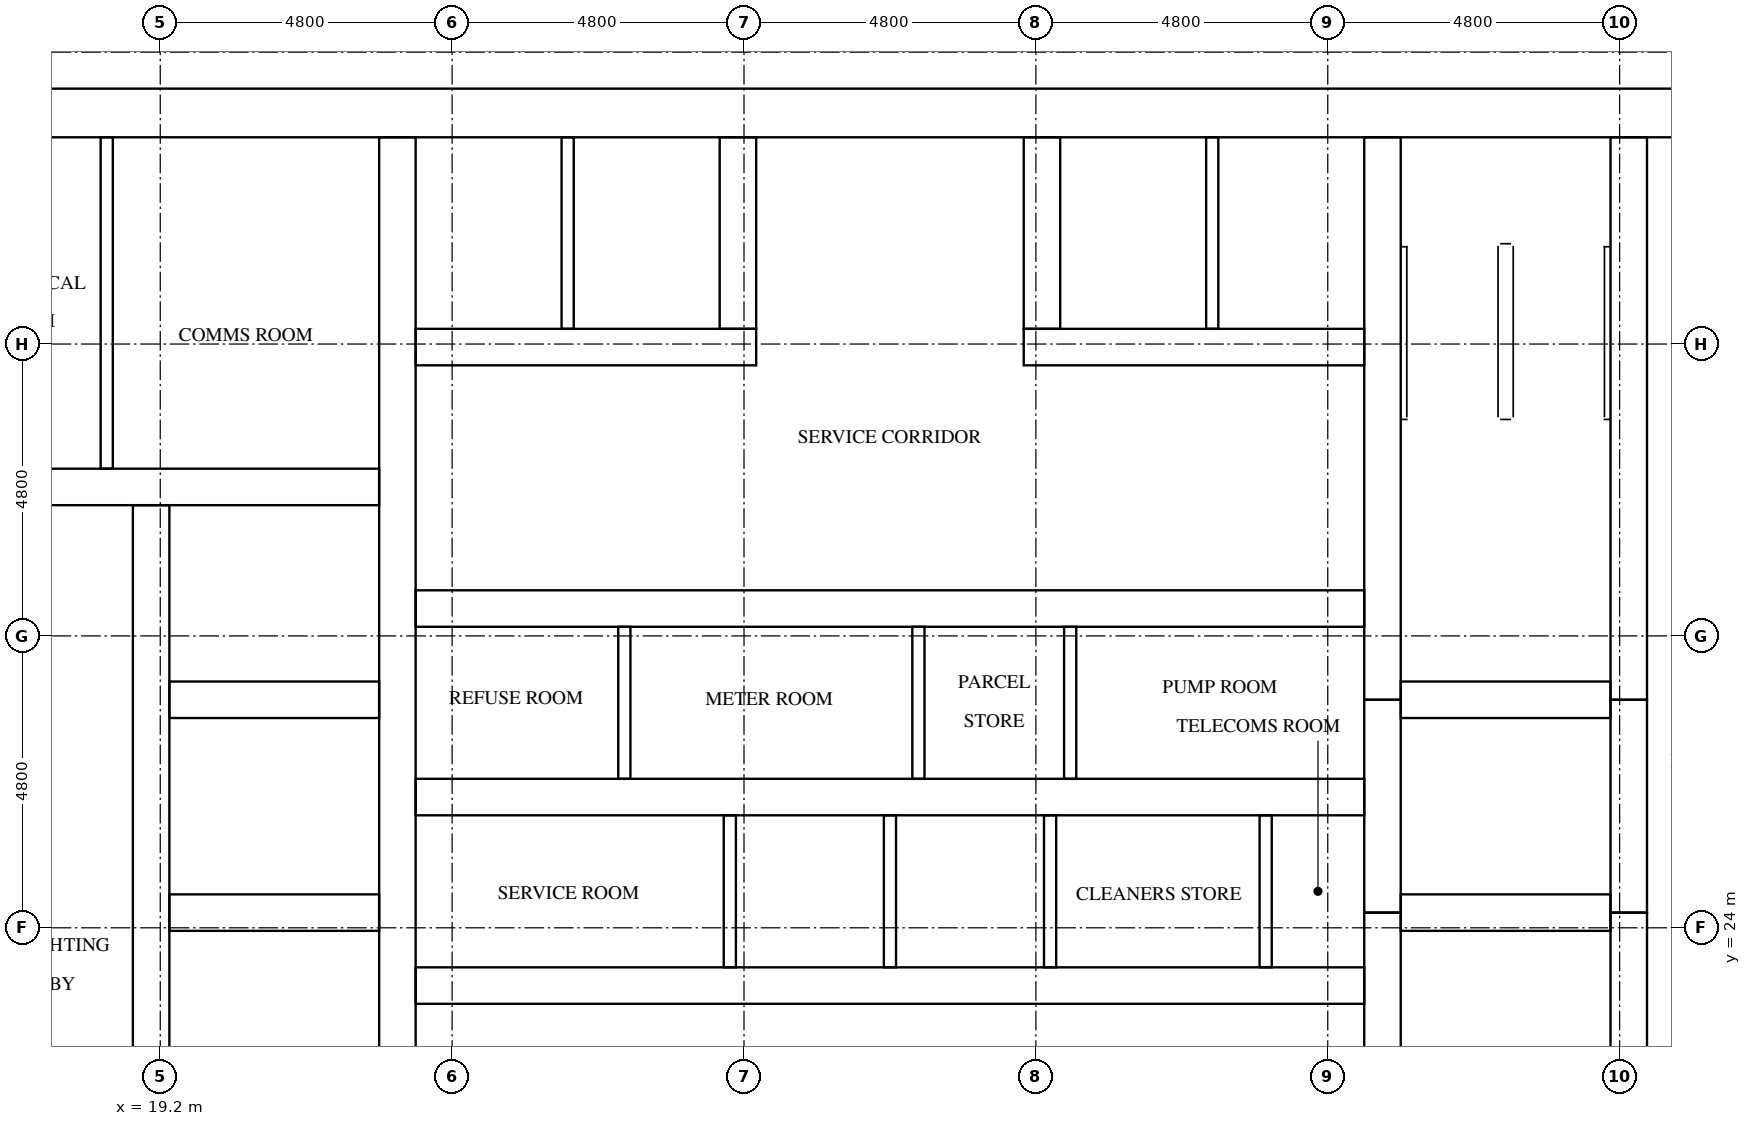
"""IFC4 building model, lengths in metres.
Left out: names, types, materials, properties, quantities, classifications, styles, units other than length and angle.
Written with IfcOpenShell. Run it as: python <this file> out.ifc"""

import sys

from ifc_helpers import new_model, si_unit, direction, frame, frame_2d, origin, place, context, subcontext, project, spatial, rectangle, extrude, element, fill, save


model = new_model("IFC4")
c1 = context("Model", 3, precision=1e-05, world=origin(), true_north=direction((0.0, 1.0)))
c2 = subcontext(c1, "Body", "Model", "MODEL_VIEW")
j1 = project(units=[si_unit("LENGTHUNIT", "METRE"), si_unit("PLANEANGLEUNIT", "RADIAN")], contexts=[c1])
p1 = place(None, origin())
s1 = spatial("IfcSite", under=j1, at=p1, CompositionType="ELEMENT")
p2 = place(p1, origin())
s2 = spatial("IfcBuilding", under=s1, at=p2, CompositionType="ELEMENT")
p3 = place(p2, frame((0.0, 0.0, 126.1)))
s3 = spatial("IfcBuildingStorey", under=s2, at=p3, CompositionType="ELEMENT", Elevation=126.1)
p4 = place(p3, frame((15.0, 37.4, 0.0), z_axis=(0.0, 0.0, 1.0), x_axis=(1.0, 0.0, 0.0)))
e1 = element("IfcWall", 1, at=p4, inside=s3, PredefinedType="SHEAR", context=c2, shape_type="SweptSolid", body=[
    extrude(rectangle(XDim=32.4, YDim=0.8, at=frame_2d((16.2, 0.0))), origin(), (0.0, 0.0, 1.0), 3.2),
])
p5 = place(p4, frame((15.3, 0.0, 0.0)))
e2 = element("IfcOpeningElement", 2, at=p5, cuts=e1, PredefinedType="OPENING", context=c2, shape_type="SweptSolid", body=[
    extrude(rectangle(XDim=1.8, YDim=2.1, at=frame_2d((0.9, 1.05))), frame((0.0, 0.41, 0.0), z_axis=(0.0, -1.0, 0.0), x_axis=(1.0, 0.0, 0.0)), (0.0, 0.0, 1.0), 0.82),
])
p6 = place(p4, frame((1.51, 0.0, 0.0)))
e3 = element("IfcOpeningElement", 3, at=p6, cuts=e1, PredefinedType="OPENING", context=c2, shape_type="SweptSolid", body=[
    extrude(rectangle(XDim=1.0, YDim=2.1, at=frame_2d((0.5, 1.05))), frame((0.0, 0.41, 0.0), z_axis=(0.0, -1.0, 0.0), x_axis=(1.0, 0.0, 0.0)), (0.0, 0.0, 1.0), 0.82),
])
p7 = place(p4, frame((5.11, 0.0, 0.0)))
e4 = element("IfcOpeningElement", 4, at=p7, cuts=e1, PredefinedType="OPENING", context=c2, shape_type="SweptSolid", body=[
    extrude(rectangle(XDim=1.0, YDim=2.1, at=frame_2d((0.5, 1.05))), frame((0.0, 0.41, 0.0), z_axis=(0.0, -1.0, 0.0), x_axis=(1.0, 0.0, 0.0)), (0.0, 0.0, 1.0), 0.82),
])
p8 = place(p3, frame((19.05, 15.8, 0.0), z_axis=(0.0, 0.0, 1.0), x_axis=(0.0, 1.0, 0.0)))
e5 = element("IfcWall", 5, at=p8, inside=s3, PredefinedType="SHEAR", context=c2, shape_type="SweptSolid", body=[
    extrude(rectangle(XDim=15.15, YDim=0.6, at=frame_2d((7.575, 0.0))), origin(), (0.0, 0.0, 1.0), 3.2),
])
p9 = place(p8, frame((9.65, 0.0, 0.0)))
e6 = element("IfcOpeningElement", 6, at=p9, cuts=e5, PredefinedType="OPENING", context=c2, shape_type="SweptSolid", body=[
    extrude(rectangle(XDim=1.1, YDim=2.1, at=frame_2d((0.55, 1.05))), frame((0.0, 0.31, 0.0), z_axis=(0.0, -1.0, 0.0), x_axis=(1.0, 0.0, 0.0)), (0.0, 0.0, 1.0), 0.62),
])
p10 = place(p8, frame((13.15, 0.0, 0.0)))
e7 = element("IfcOpeningElement", 7, at=p10, cuts=e5, PredefinedType="OPENING", context=c2, shape_type="SweptSolid", body=[
    extrude(rectangle(XDim=1.1, YDim=2.1, at=frame_2d((0.55, 1.05))), frame((0.0, 0.31, 0.0), z_axis=(0.0, -1.0, 0.0), x_axis=(1.0, 0.0, 0.0)), (0.0, 0.0, 1.0), 0.62),
])
p11 = place(p8, frame((0.4, 0.0, 0.0)))
e8 = element("IfcOpeningElement", 8, at=p11, cuts=e5, PredefinedType="OPENING", context=c2, shape_type="SweptSolid", body=[
    extrude(rectangle(XDim=1.2, YDim=2.1, at=frame_2d((0.6, 1.05))), frame((0.0, 0.31, 0.0), z_axis=(0.0, -1.0, 0.0), x_axis=(1.0, 0.0, 0.0)), (0.0, 0.0, 1.0), 0.62),
])
p12 = place(p3, frame((23.1, 15.8, 0.0), z_axis=(0.0, 0.0, 1.0), x_axis=(0.0, 1.0, 0.0)))
e9 = element("IfcWall", 9, at=p12, inside=s3, PredefinedType="SHEAR", context=c2, shape_type="SweptSolid", body=[
    extrude(rectangle(XDim=21.2, YDim=0.6, at=frame_2d((10.6, 0.0))), origin(), (0.0, 0.0, 1.0), 3.2),
])
p13 = place(p3, frame((39.3, 15.8, 0.0), z_axis=(0.0, 0.0, 1.0), x_axis=(0.0, 1.0, 0.0)))
e10 = element("IfcWall", 10, at=p13, inside=s3, PredefinedType="SHEAR", context=c2, shape_type="SweptSolid", body=[
    extrude(rectangle(XDim=8.45, YDim=0.6, at=frame_2d((4.225, 0.0))), origin(), (0.0, 0.0, 1.0), 3.2),
])
p14 = place(p3, frame((39.3, 24.25, 0.0), z_axis=(0.0, 0.0, 1.0), x_axis=(0.0, 1.0, 0.0)))
e11 = element("IfcWall", 11, at=p14, inside=s3, PredefinedType="SHEAR", context=c2, shape_type="SweptSolid", body=[
    extrude(rectangle(XDim=3.5, YDim=0.6, at=frame_2d((1.75, 0.0))), origin(), (0.0, 0.0, 1.0), 3.2),
])
p15 = place(p3, frame((39.3, 27.75, 0.0), z_axis=(0.0, 0.0, 1.0), x_axis=(0.0, 1.0, 0.0)))
e12 = element("IfcWall", 12, at=p15, inside=s3, PredefinedType="SHEAR", context=c2, shape_type="SweptSolid", body=[
    extrude(rectangle(XDim=9.25, YDim=0.6, at=frame_2d((4.625, 0.0))), origin(), (0.0, 0.0, 1.0), 3.2),
])
p16 = place(p3, frame((43.35, 15.8, 0.0), z_axis=(0.0, 0.0, 1.0), x_axis=(0.0, 1.0, 0.0)))
e13 = element("IfcWall", 13, at=p16, inside=s3, PredefinedType="SHEAR", context=c2, shape_type="SweptSolid", body=[
    extrude(rectangle(XDim=8.45, YDim=0.6, at=frame_2d((4.225, 0.0))), origin(), (0.0, 0.0, 1.0), 3.2),
])
p17 = place(p16, frame((0.4, 0.0, 0.0)))
e14 = element("IfcOpeningElement", 14, at=p17, cuts=e13, PredefinedType="OPENING", context=c2, shape_type="SweptSolid", body=[
    extrude(rectangle(XDim=1.2, YDim=2.1, at=frame_2d((0.6, 1.05))), frame((0.0, 0.31, 0.0), z_axis=(0.0, -1.0, 0.0), x_axis=(1.0, 0.0, 0.0)), (0.0, 0.0, 1.0), 0.62),
])
p18 = place(p3, frame((43.35, 24.25, 0.0), z_axis=(0.0, 0.0, 1.0), x_axis=(0.0, 1.0, 0.0)))
e15 = element("IfcWall", 15, at=p18, inside=s3, PredefinedType="SHEAR", context=c2, shape_type="SweptSolid", body=[
    extrude(rectangle(XDim=3.5, YDim=0.6, at=frame_2d((1.75, 0.0))), origin(), (0.0, 0.0, 1.0), 3.2),
])
p19 = place(p18, frame((1.2, 0.0, 0.0)))
e16 = element("IfcOpeningElement", 16, at=p19, cuts=e15, PredefinedType="OPENING", context=c2, shape_type="SweptSolid", body=[
    extrude(rectangle(XDim=1.1, YDim=2.1, at=frame_2d((0.55, 1.05))), frame((0.0, 0.31, 0.0), z_axis=(0.0, -1.0, 0.0), x_axis=(1.0, 0.0, 0.0)), (0.0, 0.0, 1.0), 0.62),
])
p20 = place(p3, frame((43.35, 27.75, 0.0), z_axis=(0.0, 0.0, 1.0), x_axis=(0.0, 1.0, 0.0)))
e17 = element("IfcWall", 17, at=p20, inside=s3, PredefinedType="SHEAR", context=c2, shape_type="SweptSolid", body=[
    extrude(rectangle(XDim=9.25, YDim=0.6, at=frame_2d((4.625, 0.0))), origin(), (0.0, 0.0, 1.0), 3.2),
])
p21 = place(p20, frame((7.65, 0.0, 0.0)))
e18 = element("IfcOpeningElement", 18, at=p21, cuts=e17, PredefinedType="OPENING", context=c2, shape_type="SweptSolid", body=[
    extrude(rectangle(XDim=1.2, YDim=2.1, at=frame_2d((0.6, 1.05))), frame((0.0, 0.31, 0.0), z_axis=(0.0, -1.0, 0.0), x_axis=(1.0, 0.0, 0.0)), (0.0, 0.0, 1.0), 0.62),
])
for number, where, z_axis, x_axis in (
    (19, (19.35, 24.25, 0.0), (0.0, 0.0, 1.0), (1.0, 0.0, 0.0)),
    (20, (19.35, 27.75, 0.0), (0.0, 0.0, 1.0), (1.0, 0.0, 0.0)),
):
    element("IfcWall", number, at=place(p3, frame(where, z_axis=z_axis, x_axis=x_axis)), inside=s3, PredefinedType="SHEAR", context=c2, shape_type="SweptSolid", body=[
        extrude(rectangle(XDim=3.45, YDim=0.6, at=frame_2d((1.725, 0.0))), origin(), (0.0, 0.0, 1.0), 3.2),
    ])
p22 = place(p3, frame((15.8, 31.25, 0.0), z_axis=(0.0, 0.0, 1.0), x_axis=(1.0, 0.0, 0.0)))
e21 = element("IfcWall", 21, at=p22, inside=s3, PredefinedType="SHEAR", context=c2, shape_type="SweptSolid", body=[
    extrude(rectangle(XDim=7.0, YDim=0.6, at=frame_2d((3.5, 0.0))), origin(), (0.0, 0.0, 1.0), 3.2),
])
for number, where, z_axis, x_axis in (
    (22, (39.6, 24.25, 0.0), (0.0, 0.0, 1.0), (1.0, 0.0, 0.0)),
    (23, (39.6, 27.75, 0.0), (0.0, 0.0, 1.0), (1.0, 0.0, 0.0)),
):
    element("IfcWall", number, at=place(p3, frame(where, z_axis=z_axis, x_axis=x_axis)), inside=s3, PredefinedType="SHEAR", context=c2, shape_type="SweptSolid", body=[
        extrude(rectangle(XDim=3.45, YDim=0.6, at=frame_2d((1.725, 0.0))), origin(), (0.0, 0.0, 1.0), 3.2),
    ])
p23 = place(p3, frame((23.4, 23.05, 0.0), z_axis=(0.0, 0.0, 1.0), x_axis=(1.0, 0.0, 0.0)))
e24 = element("IfcWall", 24, at=p23, inside=s3, PredefinedType="SHEAR", context=c2, shape_type="SweptSolid", body=[
    extrude(rectangle(XDim=15.6, YDim=0.6, at=frame_2d((7.8, 0.0))), origin(), (0.0, 0.0, 1.0), 3.2),
])
p24 = place(p23, frame((2.033, 0.0, 0.0)))
e25 = element("IfcOpeningElement", 25, at=p24, cuts=e24, PredefinedType="OPENING", context=c2, shape_type="SweptSolid", body=[
    extrude(rectangle(XDim=1.0, YDim=2.1, at=frame_2d((0.5, 1.05))), frame((0.0, 0.31, 0.0), z_axis=(0.0, -1.0, 0.0), x_axis=(1.0, 0.0, 0.0)), (0.0, 0.0, 1.0), 0.62),
])
p25 = place(p23, frame((11.706, 0.0, 0.0)))
e26 = element("IfcOpeningElement", 26, at=p25, cuts=e24, PredefinedType="OPENING", context=c2, shape_type="SweptSolid", body=[
    extrude(rectangle(XDim=1.0, YDim=2.1, at=frame_2d((0.5, 1.05))), frame((0.0, 0.31, 0.0), z_axis=(0.0, -1.0, 0.0), x_axis=(1.0, 0.0, 0.0)), (0.0, 0.0, 1.0), 0.62),
])
p26 = place(p23, frame((14.339, 0.0, 0.0)))
e27 = element("IfcOpeningElement", 27, at=p26, cuts=e24, PredefinedType="OPENING", context=c2, shape_type="SweptSolid", body=[
    extrude(rectangle(XDim=1.0, YDim=2.1, at=frame_2d((0.5, 1.05))), frame((0.0, 0.31, 0.0), z_axis=(0.0, -1.0, 0.0), x_axis=(1.0, 0.0, 0.0)), (0.0, 0.0, 1.0), 0.62),
])
p27 = place(p3, frame((23.4, 26.15, 0.0), z_axis=(0.0, 0.0, 1.0), x_axis=(1.0, 0.0, 0.0)))
e28 = element("IfcWall", 28, at=p27, inside=s3, PredefinedType="SHEAR", context=c2, shape_type="SweptSolid", body=[
    extrude(rectangle(XDim=15.6, YDim=0.6, at=frame_2d((7.8, 0.0))), origin(), (0.0, 0.0, 1.0), 3.2),
])
p28 = place(p3, frame((23.4, 29.25, 0.0), z_axis=(0.0, 0.0, 1.0), x_axis=(1.0, 0.0, 0.0)))
e29 = element("IfcWall", 29, at=p28, inside=s3, PredefinedType="SHEAR", context=c2, shape_type="SweptSolid", body=[
    extrude(rectangle(XDim=15.6, YDim=0.6, at=frame_2d((7.8, 0.0))), origin(), (0.0, 0.0, 1.0), 3.2),
])
p29 = place(p28, frame((1.166, 0.0, 0.0)))
e30 = element("IfcOpeningElement", 30, at=p29, cuts=e29, PredefinedType="OPENING", context=c2, shape_type="SweptSolid", body=[
    extrude(rectangle(XDim=1.0, YDim=2.1, at=frame_2d((0.5, 1.05))), frame((0.0, 0.31, 0.0), z_axis=(0.0, -1.0, 0.0), x_axis=(1.0, 0.0, 0.0)), (0.0, 0.0, 1.0), 0.62),
])
p30 = place(p28, frame((5.35, 0.0, 0.0)))
e31 = element("IfcOpeningElement", 31, at=p30, cuts=e29, PredefinedType="OPENING", context=c2, shape_type="SweptSolid", body=[
    extrude(rectangle(XDim=1.0, YDim=2.1, at=frame_2d((0.5, 1.05))), frame((0.0, 0.31, 0.0), z_axis=(0.0, -1.0, 0.0), x_axis=(1.0, 0.0, 0.0)), (0.0, 0.0, 1.0), 0.62),
])
p31 = place(p28, frame((9.016, 0.0, 0.0)))
e32 = element("IfcOpeningElement", 32, at=p31, cuts=e29, PredefinedType="OPENING", context=c2, shape_type="SweptSolid", body=[
    extrude(rectangle(XDim=1.0, YDim=2.1, at=frame_2d((0.5, 1.05))), frame((0.0, 0.31, 0.0), z_axis=(0.0, -1.0, 0.0), x_axis=(1.0, 0.0, 0.0)), (0.0, 0.0, 1.0), 0.62),
])
p32 = place(p28, frame((12.732, 0.0, 0.0)))
e33 = element("IfcOpeningElement", 33, at=p32, cuts=e29, PredefinedType="OPENING", context=c2, shape_type="SweptSolid", body=[
    extrude(rectangle(XDim=1.0, YDim=2.1, at=frame_2d((0.5, 1.05))), frame((0.0, 0.31, 0.0), z_axis=(0.0, -1.0, 0.0), x_axis=(1.0, 0.0, 0.0)), (0.0, 0.0, 1.0), 0.62),
])
for number, where, z_axis, x_axis in (
    (34, (23.4, 33.55, 0.0), (0.0, 0.0, 1.0), (1.0, 0.0, 0.0)),
    (35, (33.4, 33.55, 0.0), (0.0, 0.0, 1.0), (1.0, 0.0, 0.0)),
):
    element("IfcWall", number, at=place(p3, frame(where, z_axis=z_axis, x_axis=x_axis)), inside=s3, PredefinedType="SHEAR", context=c2, shape_type="SweptSolid", body=[
        extrude(rectangle(XDim=5.6, YDim=0.6, at=frame_2d((2.8, 0.0))), origin(), (0.0, 0.0, 1.0), 3.2),
    ])
for number, where, z_axis, x_axis in (
    (36, (28.7, 33.85, 0.0), (0.0, 0.0, 1.0), (0.0, 1.0, 0.0)),
    (37, (33.7, 33.85, 0.0), (0.0, 0.0, 1.0), (0.0, 1.0, 0.0)),
):
    element("IfcWall", number, at=place(p3, frame(where, z_axis=z_axis, x_axis=x_axis)), inside=s3, PredefinedType="SHEAR", context=c2, shape_type="SweptSolid", body=[
        extrude(rectangle(XDim=3.15, YDim=0.6, at=frame_2d((1.575, 0.0))), origin(), (0.0, 0.0, 1.0), 3.2),
    ])
for number, where, z_axis, x_axis in (
    (38, (28.567, 23.35, 0.0), (0.0, 0.0, 1.0), (0.0, 1.0, 0.0)),
    (39, (31.2, 23.35, 0.0), (0.0, 0.0, 1.0), (0.0, 1.0, 0.0)),
    (40, (33.833, 23.35, 0.0), (0.0, 0.0, 1.0), (0.0, 1.0, 0.0)),
):
    element("IfcWall", number, at=place(p3, frame(where, z_axis=z_axis, x_axis=x_axis)), inside=s3, PredefinedType="SOLIDWALL", context=c2, shape_type="SweptSolid", body=[
        extrude(rectangle(XDim=2.5, YDim=0.2, at=frame_2d((1.25, 0.0))), origin(), (0.0, 0.0, 1.0), 3.2),
    ])
for number, where, z_axis, x_axis in (
    (41, (25.9, 33.85, 0.0), (0.0, 0.0, 1.0), (0.0, 1.0, 0.0)),
    (42, (36.5, 33.85, 0.0), (0.0, 0.0, 1.0), (0.0, 1.0, 0.0)),
):
    element("IfcWall", number, at=place(p3, frame(where, z_axis=z_axis, x_axis=x_axis)), inside=s3, PredefinedType="SOLIDWALL", context=c2, shape_type="SweptSolid", body=[
        extrude(rectangle(XDim=3.15, YDim=0.2, at=frame_2d((1.575, 0.0))), origin(), (0.0, 0.0, 1.0), 3.2),
    ])
p33 = place(p3, frame((18.32, 31.55, 0.0), z_axis=(0.0, 0.0, 1.0), x_axis=(0.0, 1.0, 0.0)))
e43 = element("IfcWall", 43, at=p33, inside=s3, PredefinedType="PARTITIONING", context=c2, shape_type="SweptSolid", body=[
    extrude(rectangle(XDim=5.45, YDim=0.2, at=frame_2d((2.725, 0.0))), origin(), (0.0, 0.0, 1.0), 3.2),
])
for number, where, z_axis, x_axis in (
    (44, (37.379, 23.35, 0.0), (0.0, 0.0, 1.0), (0.0, 1.0, 0.0)),
    (45, (26.832, 26.45, 0.0), (0.0, 0.0, 1.0), (0.0, 1.0, 0.0)),
    (46, (31.668, 26.45, 0.0), (0.0, 0.0, 1.0), (0.0, 1.0, 0.0)),
    (47, (34.164, 26.45, 0.0), (0.0, 0.0, 1.0), (0.0, 1.0, 0.0)),
):
    element("IfcWall", number, at=place(p3, frame(where, z_axis=z_axis, x_axis=x_axis)), inside=s3, PredefinedType="PARTITIONING", context=c2, shape_type="SweptSolid", body=[
        extrude(rectangle(XDim=2.5, YDim=0.2, at=frame_2d((1.25, 0.0))), origin(), (0.0, 0.0, 1.0), 3.2),
    ])
p34 = place(p9, origin())
e48 = element("IfcDoor", 48, at=p34, inside=s3, OperationType="DOUBLE_DOOR_SLIDING", PredefinedType="DOOR", context=c2, shape_type="SweptSolid", body=[
    extrude(rectangle(XDim=1.1, YDim=2.1, at=frame_2d((0.55, 1.05))), frame((0.0, 0.025, 0.0), z_axis=(0.0, -1.0, 0.0), x_axis=(1.0, 0.0, 0.0)), (0.0, 0.0, 1.0), 0.05),
])
fill(e6, e48)
p35 = place(p10, origin())
e49 = element("IfcDoor", 49, at=p35, inside=s3, OperationType="DOUBLE_DOOR_SLIDING", PredefinedType="DOOR", context=c2, shape_type="SweptSolid", body=[
    extrude(rectangle(XDim=1.1, YDim=2.1, at=frame_2d((0.55, 1.05))), frame((0.0, 0.025, 0.0), z_axis=(0.0, -1.0, 0.0), x_axis=(1.0, 0.0, 0.0)), (0.0, 0.0, 1.0), 0.05),
])
fill(e7, e49)
p36 = place(p19, origin())
e50 = element("IfcDoor", 50, at=p36, inside=s3, OperationType="DOUBLE_DOOR_SLIDING", PredefinedType="DOOR", context=c2, shape_type="SweptSolid", body=[
    extrude(rectangle(XDim=1.1, YDim=2.1, at=frame_2d((0.55, 1.05))), frame((0.0, 0.025, 0.0), z_axis=(0.0, -1.0, 0.0), x_axis=(1.0, 0.0, 0.0)), (0.0, 0.0, 1.0), 0.05),
])
fill(e16, e50)
p37 = place(p21, origin())
e51 = element("IfcDoor", 51, at=p37, inside=s3, OperationType="SINGLE_SWING_RIGHT", PredefinedType="DOOR", context=c2, shape_type="SweptSolid", body=[
    extrude(rectangle(XDim=1.2, YDim=2.1, at=frame_2d((0.6, 1.05))), frame((0.0, 0.025, 0.0), z_axis=(0.0, -1.0, 0.0), x_axis=(1.0, 0.0, 0.0)), (0.0, 0.0, 1.0), 0.05),
])
fill(e18, e51)
p38 = place(p5, origin())
e52 = element("IfcDoor", 52, at=p38, inside=s3, OperationType="DOUBLE_DOOR_SINGLE_SWING", PredefinedType="DOOR", context=c2, shape_type="SweptSolid", body=[
    extrude(rectangle(XDim=1.8, YDim=2.1, at=frame_2d((0.9, 1.05))), frame((0.0, 0.025, 0.0), z_axis=(0.0, -1.0, 0.0), x_axis=(1.0, 0.0, 0.0)), (0.0, 0.0, 1.0), 0.05),
])
fill(e2, e52)
p39 = place(p6, origin())
e53 = element("IfcDoor", 53, at=p39, inside=s3, OperationType="SINGLE_SWING_LEFT", PredefinedType="DOOR", context=c2, shape_type="SweptSolid", body=[
    extrude(rectangle(XDim=1.0, YDim=2.1, at=frame_2d((0.5, 1.05))), frame((0.0, 0.025, 0.0), z_axis=(0.0, -1.0, 0.0), x_axis=(1.0, 0.0, 0.0)), (0.0, 0.0, 1.0), 0.05),
])
fill(e3, e53)
p40 = place(p7, origin())
e54 = element("IfcDoor", 54, at=p40, inside=s3, OperationType="SINGLE_SWING_RIGHT", PredefinedType="DOOR", context=c2, shape_type="SweptSolid", body=[
    extrude(rectangle(XDim=1.0, YDim=2.1, at=frame_2d((0.5, 1.05))), frame((0.0, 0.025, 0.0), z_axis=(0.0, -1.0, 0.0), x_axis=(1.0, 0.0, 0.0)), (0.0, 0.0, 1.0), 0.05),
])
fill(e4, e54)
p41 = place(p24, frame((1.0, 0.0, 0.0), z_axis=(0.0, 0.0, 1.0), x_axis=(-1.0, 0.0, 0.0)))
e55 = element("IfcDoor", 55, at=p41, inside=s3, OperationType="SINGLE_SWING_LEFT", PredefinedType="DOOR", context=c2, shape_type="SweptSolid", body=[
    extrude(rectangle(XDim=1.0, YDim=2.1, at=frame_2d((0.5, 1.05))), frame((0.0, 0.025, 0.0), z_axis=(0.0, -1.0, 0.0), x_axis=(1.0, 0.0, 0.0)), (0.0, 0.0, 1.0), 0.05),
])
fill(e25, e55)
p42 = place(p25, frame((1.0, 0.0, 0.0), z_axis=(0.0, 0.0, 1.0), x_axis=(-1.0, 0.0, 0.0)))
e56 = element("IfcDoor", 56, at=p42, inside=s3, OperationType="SINGLE_SWING_RIGHT", PredefinedType="DOOR", context=c2, shape_type="SweptSolid", body=[
    extrude(rectangle(XDim=1.0, YDim=2.1, at=frame_2d((0.5, 1.05))), frame((0.0, 0.025, 0.0), z_axis=(0.0, -1.0, 0.0), x_axis=(1.0, 0.0, 0.0)), (0.0, 0.0, 1.0), 0.05),
])
fill(e26, e56)
p43 = place(p26, frame((1.0, 0.0, 0.0), z_axis=(0.0, 0.0, 1.0), x_axis=(-1.0, 0.0, 0.0)))
e57 = element("IfcDoor", 57, at=p43, inside=s3, OperationType="SINGLE_SWING_LEFT", PredefinedType="DOOR", context=c2, shape_type="SweptSolid", body=[
    extrude(rectangle(XDim=1.0, YDim=2.1, at=frame_2d((0.5, 1.05))), frame((0.0, 0.025, 0.0), z_axis=(0.0, -1.0, 0.0), x_axis=(1.0, 0.0, 0.0)), (0.0, 0.0, 1.0), 0.05),
])
fill(e27, e57)
p44 = place(p29, origin())
e58 = element("IfcDoor", 58, at=p44, inside=s3, OperationType="SINGLE_SWING_RIGHT", PredefinedType="DOOR", context=c2, shape_type="SweptSolid", body=[
    extrude(rectangle(XDim=1.0, YDim=2.1, at=frame_2d((0.5, 1.05))), frame((0.0, 0.025, 0.0), z_axis=(0.0, -1.0, 0.0), x_axis=(1.0, 0.0, 0.0)), (0.0, 0.0, 1.0), 0.05),
])
fill(e30, e58)
p45 = place(p30, origin())
e59 = element("IfcDoor", 59, at=p45, inside=s3, OperationType="SINGLE_SWING_LEFT", PredefinedType="DOOR", context=c2, shape_type="SweptSolid", body=[
    extrude(rectangle(XDim=1.0, YDim=2.1, at=frame_2d((0.5, 1.05))), frame((0.0, 0.025, 0.0), z_axis=(0.0, -1.0, 0.0), x_axis=(1.0, 0.0, 0.0)), (0.0, 0.0, 1.0), 0.05),
])
fill(e31, e59)
p46 = place(p31, origin())
e60 = element("IfcDoor", 60, at=p46, inside=s3, OperationType="SINGLE_SWING_RIGHT", PredefinedType="DOOR", context=c2, shape_type="SweptSolid", body=[
    extrude(rectangle(XDim=1.0, YDim=2.1, at=frame_2d((0.5, 1.05))), frame((0.0, 0.025, 0.0), z_axis=(0.0, -1.0, 0.0), x_axis=(1.0, 0.0, 0.0)), (0.0, 0.0, 1.0), 0.05),
])
fill(e32, e60)
p47 = place(p32, origin())
e61 = element("IfcDoor", 61, at=p47, inside=s3, OperationType="SINGLE_SWING_LEFT", PredefinedType="DOOR", context=c2, shape_type="SweptSolid", body=[
    extrude(rectangle(XDim=1.0, YDim=2.1, at=frame_2d((0.5, 1.05))), frame((0.0, 0.025, 0.0), z_axis=(0.0, -1.0, 0.0), x_axis=(1.0, 0.0, 0.0)), (0.0, 0.0, 1.0), 0.05),
])
fill(e33, e61)
save(model, sys.argv[1])
